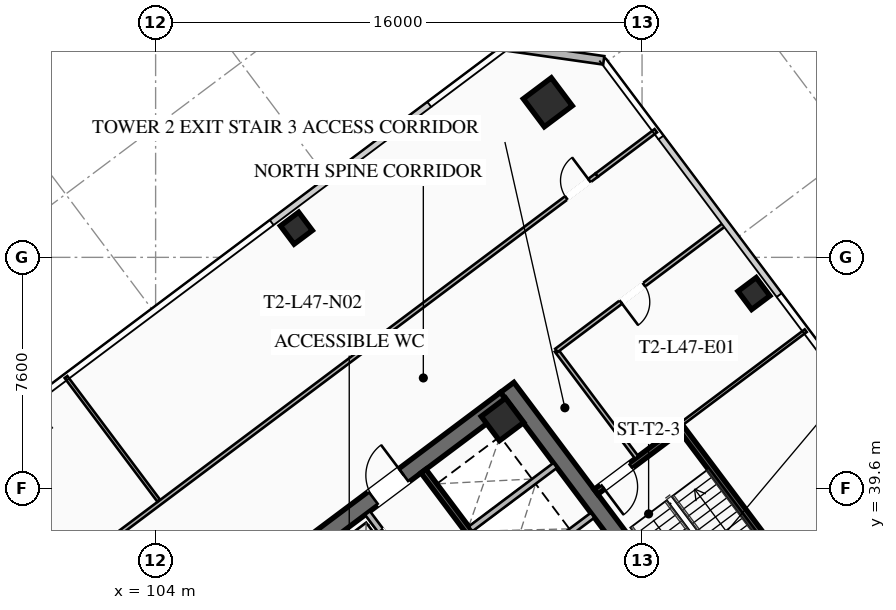
"""IFC4 building model, lengths in metres.
Left out: names, types, materials, properties, quantities, classifications, styles, units other than length and angle.
Written with IfcOpenShell. Run it as: python <this file> out.ifc"""

import sys

from ifc_helpers import new_model, si_unit, direction, frame, frame_2d, origin, origin_2d, place, context, subcontext, project, spatial, rectangle, hollow_rectangle, extrude, element, fill, save


model = new_model("IFC4")
c1 = context("Model", 3, precision=1e-05, world=origin(), true_north=direction((0.0, 1.0)))
c2 = subcontext(c1, "Body", "Model", "MODEL_VIEW")
j1 = project(units=[si_unit("LENGTHUNIT", "METRE"), si_unit("PLANEANGLEUNIT", "RADIAN")], contexts=[c1])
p1 = place(None, origin())
s1 = spatial("IfcSite", under=j1, at=p1, CompositionType="ELEMENT")
p2 = place(p1, origin())
s2 = spatial("IfcBuilding", under=s1, at=p2, CompositionType="ELEMENT")
p3 = place(p2, frame((0.0, 0.0, 174.75)))
s3 = spatial("IfcBuildingStorey", under=s2, at=p3, CompositionType="ELEMENT", Elevation=174.75)
p4 = place(p3, frame((115.564, 42.923, 0.0), z_axis=(0.0, 0.0, 1.0), x_axis=(0.600005007985, -0.799996243986, 0.0)))
e1 = element("IfcWall", 1, at=p4, inside=s3, PredefinedType="SHEAR", context=c2, shape_type="SweptSolid", body=[
    extrude(rectangle(XDim=15.6, YDim=0.55, at=frame_2d((7.8, 0.0))), origin(), (0.0, 0.0, 1.0), 3.55),
])
p5 = place(p3, frame((103.461, 33.502, 0.0), z_axis=(0.0, 0.0, 1.0), x_axis=(0.799998054672, 0.600002593761, 0.0)))
e2 = element("IfcWall", 2, at=p5, inside=s3, PredefinedType="SHEAR", context=c2, shape_type="SweptSolid", body=[
    extrude(rectangle(XDim=15.06, YDim=0.55, at=frame_2d((7.53, 0.0))), origin(), (0.0, 0.0, 1.0), 3.55),
])
p6 = place(p5, frame((4.58, 0.0, 0.0)))
e3 = element("IfcOpeningElement", 3, at=p6, cuts=e2, PredefinedType="OPENING", context=c2, shape_type="SweptSolid", body=[
    extrude(rectangle(XDim=1.25, YDim=2.25, at=frame_2d((0.625, 1.125))), frame((0.0, 0.285, 0.0), z_axis=(0.0, -1.0, 0.0), x_axis=(1.0, 0.0, 0.0)), (0.0, 0.0, 1.0), 0.57),
])
p7 = place(p5, frame((9.63, 0.0, 0.0)))
e4 = element("IfcOpeningElement", 4, at=p7, cuts=e2, PredefinedType="OPENING", context=c2, shape_type="SweptSolid", body=[
    extrude(rectangle(XDim=1.25, YDim=2.25, at=frame_2d((0.625, 1.125))), frame((0.0, 0.285, 0.0), z_axis=(0.0, -1.0, 0.0), x_axis=(1.0, 0.0, 0.0)), (0.0, 0.0, 1.0), 0.57),
])
p8 = place(p3, frame((115.41, 41.87, 0.0), z_axis=(0.0, 0.0, 1.0), x_axis=(0.799999996291, 0.600000004945, 0.0)))
e5 = element("IfcColumn", 5, at=p8, inside=s3, PredefinedType="COLUMN", context=c2, shape_type="SweptSolid", body=[
    extrude(hollow_rectangle(XDim=1.0, YDim=1.0, WallThickness=0.04, at=origin_2d()), origin(), (0.0, 0.0, 1.0), 3.37),
])
p9 = place(p3, frame((116.9, 52.3, 0.0), z_axis=(0.0, 0.0, 1.0), x_axis=(0.799999996291, 0.600000004945, 0.0)))
e6 = element("IfcColumn", 6, at=p9, inside=s3, PredefinedType="COLUMN", context=c2, shape_type="SweptSolid", body=[
    extrude(hollow_rectangle(XDim=1.15, YDim=1.15, WallThickness=0.045, at=origin_2d()), origin(), (0.0, 0.0, 1.0), 3.37),
])
for number, where, z_axis, x_axis in (
    (7, (123.68, 46.01, 0.0), (0.0, 0.0, 1.0), (0.8, 0.6, 0.0)),
    (8, (108.63, 48.16, 0.0), (0.0, 0.0, 1.0), (0.8, 0.6, 0.0)),
):
    element("IfcColumn", number, at=place(p3, frame(where, z_axis=z_axis, x_axis=x_axis)), inside=s3, PredefinedType="COLUMN", context=c2, shape_type="SweptSolid", body=[
        extrude(hollow_rectangle(XDim=0.75, YDim=0.75, WallThickness=0.032, at=origin_2d()), origin(), (0.0, 0.0, 1.0), 3.37),
    ])
p10 = place(p3, frame((115.52, 54.14, 0.0), z_axis=(0.0, 0.0, 1.0), x_axis=(0.989950994782, -0.141410847992, 0.0)))
e9 = element("IfcWall", 9, at=p10, inside=s3, PredefinedType="SOLIDWALL", context=c2, shape_type="SweptSolid", body=[
    extrude(rectangle(XDim=3.253, YDim=0.28, at=frame_2d((1.626, 0.0))), origin(), (0.0, 0.0, 1.0), 3.37),
])
p11 = place(p3, frame((112.81, 40.17, 0.0), z_axis=(0.0, 0.0, 1.0), x_axis=(0.599993943644, -0.800004542231, 0.0)))
e10 = element("IfcWall", 10, at=p11, inside=s3, PredefinedType="SHEAR", context=c2, shape_type="SweptSolid", body=[
    extrude(rectangle(XDim=6.45, YDim=0.2, at=frame_2d((3.225, 0.0))), origin(), (0.0, 0.0, 1.0), 3.37),
])
for number, where, z_axis, x_axis in (
    (11, (115.59, 36.63, 0.0), (0.0, 0.0, 1.0), (0.8, 0.6, 0.0)),
    (12, (114.36, 38.27, 0.0), (0.0, 0.0, 1.0), (0.8, 0.6, 0.0)),
):
    element("IfcWall", number, at=place(p3, frame(where, z_axis=z_axis, x_axis=x_axis)), inside=s3, PredefinedType="SOLIDWALL", context=c2, shape_type="SweptSolid", body=[
        extrude(rectangle(XDim=3.48, YDim=0.2, at=frame_2d((1.74, 0.0))), origin(), (0.0, 0.0, 1.0), 3.37),
    ])
p12 = place(p3, frame((115.11, 33.27, 0.0), z_axis=(0.0, 0.0, 1.0), x_axis=(-0.600011322243, 0.799991508192, 0.0)))
e13 = element("IfcWall", 13, at=p12, inside=s3, PredefinedType="SOLIDWALL", context=c2, shape_type="SweptSolid", body=[
    extrude(rectangle(XDim=6.9, YDim=0.2, at=frame_2d((3.45, 0.0))), origin(), (0.0, 0.0, 1.0), 3.37),
])
p13 = place(p12, frame((0.575, 0.0, 0.0)))
e14 = element("IfcOpeningElement", 14, at=p13, cuts=e13, PredefinedType="OPENING", context=c2, shape_type="SweptSolid", body=[
    extrude(rectangle(XDim=1.1, YDim=2.2, at=frame_2d((0.55, 1.1))), frame((0.0, 0.11, 0.0), z_axis=(0.0, -1.0, 0.0), x_axis=(1.0, 0.0, 0.0)), (0.0, 0.0, 1.0), 0.22),
])
p14 = place(p12, frame((2.825, 0.0, 0.0)))
e15 = element("IfcOpeningElement", 15, at=p14, cuts=e13, PredefinedType="OPENING", context=c2, shape_type="SweptSolid", body=[
    extrude(rectangle(XDim=1.1, YDim=2.2, at=frame_2d((0.55, 1.1))), frame((0.0, 0.11, 0.0), z_axis=(0.0, -1.0, 0.0), x_axis=(1.0, 0.0, 0.0)), (0.0, 0.0, 1.0), 0.22),
])
p15 = place(p12, frame((5.075, 0.0, 0.0)))
e16 = element("IfcOpeningElement", 16, at=p15, cuts=e13, PredefinedType="OPENING", context=c2, shape_type="SweptSolid", body=[
    extrude(rectangle(XDim=1.1, YDim=2.2, at=frame_2d((0.55, 1.1))), frame((0.0, 0.11, 0.0), z_axis=(0.0, -1.0, 0.0), x_axis=(1.0, 0.0, 0.0)), (0.0, 0.0, 1.0), 0.22),
])
p16 = place(p3, frame((125.304, 36.228, 0.0), z_axis=(0.0, 0.0, 1.0), x_axis=(-0.59998851072, 0.800008616831, 0.0)))
e17 = element("IfcWall", 17, at=p16, inside=s3, PredefinedType="SHEAR", context=c2, shape_type="SweptSolid", body=[
    extrude(rectangle(XDim=6.8, YDim=0.2, at=frame_2d((3.4, 0.0))), origin(), (0.0, 0.0, 1.0), 3.37),
])
p17 = place(p3, frame((121.204, 41.528, 0.0), z_axis=(0.0, 0.0, 1.0), x_axis=(-0.800017232136, -0.599977023131, 0.0)))
e18 = element("IfcWall", 18, at=p17, inside=s3, PredefinedType="SHEAR", context=c2, shape_type="SweptSolid", body=[
    extrude(rectangle(XDim=3.4, YDim=0.2, at=frame_2d((1.7, 0.0))), origin(), (0.0, 0.0, 1.0), 3.37),
])
p18 = place(p17, frame((1.975, 0.0, 0.0)))
e19 = element("IfcOpeningElement", 19, at=p18, cuts=e18, PredefinedType="OPENING", context=c2, shape_type="SweptSolid", body=[
    extrude(rectangle(XDim=1.15, YDim=2.2, at=frame_2d((0.575, 1.1))), frame((0.0, 0.11, 0.0), z_axis=(0.0, -1.0, 0.0), x_axis=(1.0, 0.0, 0.0)), (0.0, 0.0, 1.0), 0.22),
])
p19 = place(p3, frame((119.824, 40.618, 0.0), z_axis=(0.0, 0.0, 1.0), x_axis=(-0.599982243973, 0.800013316712, 0.0)))
e20 = element("IfcWall", 20, at=p19, inside=s3, PredefinedType="PARTITIONING", context=c2, shape_type="SweptSolid", body=[
    extrude(rectangle(XDim=4.4, YDim=0.135, at=frame_2d((2.2, 0.0))), origin(), (0.0, 0.0, 1.0), 2.723),
])
p20 = place(p3, frame((95.548, 32.686, 0.0), z_axis=(0.0, 0.0, 1.0), x_axis=(0.8, 0.6, 0.0)))
e21 = element("IfcWall", 21, at=p20, inside=s3, PredefinedType="PARTITIONING", context=c2, shape_type="SweptSolid", body=[
    extrude(rectangle(XDim=28.7, YDim=0.135, at=frame_2d((14.35, 0.0))), origin(), (0.0, 0.0, 1.0), 2.723),
])
p21 = place(p20, frame((0.3, 0.0, 0.0)))
e22 = element("IfcOpeningElement", 22, at=p21, cuts=e21, PredefinedType="OPENING", context=c2, shape_type="SweptSolid", body=[
    extrude(rectangle(XDim=0.95, YDim=2.05, at=frame_2d((0.475, 1.025))), frame((0.0, 0.077, 0.0), z_axis=(0.0, -1.0, 0.0), x_axis=(1.0, 0.0, 0.0)), (0.0, 0.0, 1.0), 0.155),
])
p22 = place(p20, frame((27.45, 0.0, 0.0)))
e23 = element("IfcOpeningElement", 23, at=p22, cuts=e21, PredefinedType="OPENING", context=c2, shape_type="SweptSolid", body=[
    extrude(rectangle(XDim=0.95, YDim=2.05, at=frame_2d((0.475, 1.025))), frame((0.0, 0.077, 0.0), z_axis=(0.0, -1.0, 0.0), x_axis=(1.0, 0.0, 0.0)), (0.0, 0.0, 1.0), 0.155),
])
p23 = place(p3, frame((118.508, 49.906, 0.0), z_axis=(0.0, 0.0, 1.0), x_axis=(0.799975885537, 0.600032151272, 0.0)))
e24 = element("IfcWall", 24, at=p23, inside=s3, PredefinedType="PARTITIONING", context=c2, shape_type="SweptSolid", body=[
    extrude(rectangle(XDim=2.43, YDim=0.135, at=frame_2d((1.215, 0.0))), origin(), (0.0, 0.0, 1.0), 2.723),
])
p24 = place(p3, frame((104.1, 39.2, 0.0), z_axis=(0.0, 0.0, 1.0), x_axis=(-0.600015378737, 0.799988465716, 0.0)))
e25 = element("IfcWall", 25, at=p24, inside=s3, PredefinedType="PARTITIONING", context=c2, shape_type="SweptSolid", body=[
    extrude(rectangle(XDim=5.08, YDim=0.11, at=frame_2d((2.54, 0.0))), origin(), (0.0, 0.0, 1.0), 2.723),
])
p25 = place(p3, frame((122.744, 48.308, 0.0), z_axis=(0.0, 0.0, 1.0), x_axis=(-0.79997892247, -0.600028102345, 0.0)))
e26 = element("IfcWall", 26, at=p25, inside=s3, PredefinedType="PARTITIONING", context=c2, shape_type="SweptSolid", body=[
    extrude(rectangle(XDim=6.95, YDim=0.135, at=frame_2d((3.475, 0.0))), origin(), (0.0, 0.0, 1.0), 2.723),
])
p26 = place(p25, frame((3.35, 0.0, 0.0)))
e27 = element("IfcOpeningElement", 27, at=p26, cuts=e26, PredefinedType="OPENING", context=c2, shape_type="SweptSolid", body=[
    extrude(rectangle(XDim=0.95, YDim=2.05, at=frame_2d((0.475, 1.025))), frame((0.0, 0.077, 0.0), z_axis=(0.0, -1.0, 0.0), x_axis=(1.0, 0.0, 0.0)), (0.0, 0.0, 1.0), 0.155),
])
p27 = place(p3, frame((125.384, 44.788, 0.0), z_axis=(0.0, 0.0, 1.0), x_axis=(-0.8, -0.6, 0.0)))
e28 = element("IfcWall", 28, at=p27, inside=s3, PredefinedType="PARTITIONING", context=c2, shape_type="SweptSolid", body=[
    extrude(rectangle(XDim=5.1, YDim=0.11, at=frame_2d((2.55, 0.0))), origin(), (0.0, 0.0, 1.0), 2.723),
])
p28 = place(p7, origin())
e29 = element("IfcDoor", 29, at=p28, inside=s3, OperationType="SINGLE_SWING_RIGHT", PredefinedType="DOOR", context=c2, shape_type="SweptSolid", body=[
    extrude(rectangle(XDim=1.25, YDim=2.25, at=frame_2d((0.625, 1.125))), frame((0.0, 0.025, 0.0), z_axis=(0.0, -1.0, 0.0), x_axis=(1.0, 0.0, 0.0)), (0.0, 0.0, 1.0), 0.05),
])
fill(e4, e29)
p29 = place(p18, origin())
e30 = element("IfcDoor", 30, at=p29, inside=s3, OperationType="SINGLE_SWING_RIGHT", PredefinedType="DOOR", context=c2, shape_type="SweptSolid", body=[
    extrude(rectangle(XDim=1.15, YDim=2.2, at=frame_2d((0.575, 1.1))), frame((0.0, 0.025, 0.0), z_axis=(0.0, -1.0, 0.0), x_axis=(1.0, 0.0, 0.0)), (0.0, 0.0, 1.0), 0.05),
])
fill(e19, e30)
p30 = place(p22, origin())
e31 = element("IfcDoor", 31, at=p30, inside=s3, OperationType="SINGLE_SWING_RIGHT", PredefinedType="DOOR", context=c2, shape_type="SweptSolid", body=[
    extrude(rectangle(XDim=0.95, YDim=2.05, at=frame_2d((0.475, 1.025))), frame((0.0, 0.025, 0.0), z_axis=(0.0, -1.0, 0.0), x_axis=(1.0, 0.0, 0.0)), (0.0, 0.0, 1.0), 0.05),
])
fill(e23, e31)
p31 = place(p26, origin())
e32 = element("IfcDoor", 32, at=p31, inside=s3, OperationType="SINGLE_SWING_RIGHT", PredefinedType="DOOR", context=c2, shape_type="SweptSolid", body=[
    extrude(rectangle(XDim=0.95, YDim=2.05, at=frame_2d((0.475, 1.025))), frame((0.0, 0.025, 0.0), z_axis=(0.0, -1.0, 0.0), x_axis=(1.0, 0.0, 0.0)), (0.0, 0.0, 1.0), 0.05),
])
fill(e27, e32)
save(model, sys.argv[1])
